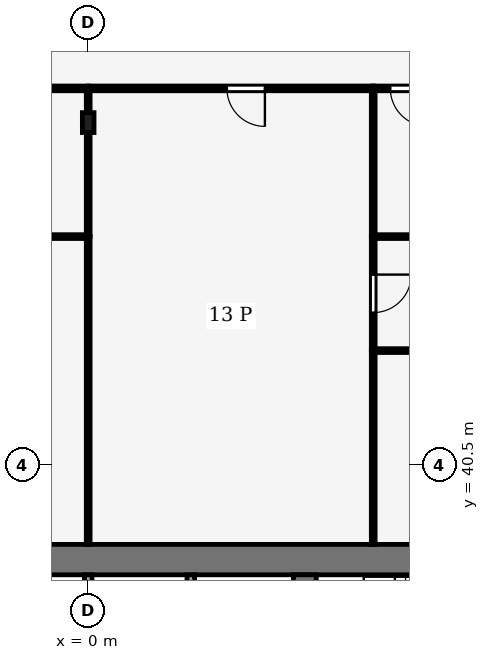
"""IFC4 building model, lengths in metres.
Left out: names, types, materials, properties, quantities, classifications, styles, units other than length and angle.
Written with IfcOpenShell. Run it as: python <this file> out.ifc"""

import sys

from ifc_helpers import new_model, si_unit, direction, frame, frame_2d, origin, origin_2d, place, context, subcontext, project, spatial, rectangle, i_section, extrude, element, fill, save


model = new_model("IFC4")
c1 = context("Model", 3, precision=1e-05, world=origin(), true_north=direction((0.0, 1.0)))
c2 = subcontext(c1, "Body", "Model", "MODEL_VIEW")
j1 = project(units=[si_unit("LENGTHUNIT", "METRE"), si_unit("PLANEANGLEUNIT", "RADIAN")], contexts=[c1])
p1 = place(None, origin())
s1 = spatial("IfcSite", under=j1, at=p1, CompositionType="ELEMENT")
p2 = place(p1, origin())
s2 = spatial("IfcBuilding", under=s1, at=p2, CompositionType="ELEMENT")
p3 = place(p2, frame((0.0, 0.0, 258.0)))
s3 = spatial("IfcBuildingStorey", under=s2, at=p3, CompositionType="ELEMENT", Elevation=258.0)
p4 = place(p3, frame((-13.4, 38.0, -0.13), z_axis=(0.0, 0.0, 1.0), x_axis=(1.0, 0.0, 0.0)))
e1 = element("IfcWall", 1, at=p4, inside=s3, PredefinedType="SHEAR", context=c2, shape_type="SweptSolid", body=[
    extrude(rectangle(XDim=26.8, YDim=0.8, at=frame_2d((13.4, 0.0))), origin(), (0.0, 0.0, 1.0), 4.0),
])
p5 = place(p3, frame((5.7, 18.4, -0.13), z_axis=(0.0, 0.0, 1.0), x_axis=(0.0, 1.0, 0.0)))
e2 = element("IfcWall", 2, at=p5, inside=s3, PredefinedType="SHEAR", context=c2, shape_type="SweptSolid", body=[
    extrude(rectangle(XDim=19.2, YDim=0.6, at=frame_2d((9.6, 0.0))), origin(), (0.0, 0.0, 1.0), 4.0),
])
p6 = place(p5, frame((8.35, 0.0, 0.13)))
e3 = element("IfcOpeningElement", 3, at=p6, cuts=e2, PredefinedType="OPENING", context=c2, shape_type="SweptSolid", body=[
    extrude(rectangle(XDim=0.9, YDim=2.1, at=frame_2d((0.45, 1.05))), frame((0.0, 0.31, 0.0), z_axis=(0.0, -1.0, 0.0), x_axis=(1.0, 0.0, 0.0)), (0.0, 0.0, 1.0), 0.62),
])
p7 = place(p5, frame((13.3, 0.0, 0.13)))
e4 = element("IfcOpeningElement", 4, at=p7, cuts=e2, PredefinedType="OPENING", context=c2, shape_type="SweptSolid", body=[
    extrude(rectangle(XDim=2.4, YDim=2.4, at=frame_2d((1.2, 1.2))), frame((0.0, 0.31, 0.0), z_axis=(0.0, -1.0, 0.0), x_axis=(1.0, 0.0, 0.0)), (0.0, 0.0, 1.0), 0.62),
])
p8 = place(p3, frame((0.0, 49.5, 0.0), z_axis=(0.0, 0.0, 1.0), x_axis=(1.0, 0.0, 0.0)))
e5 = element("IfcColumn", 5, at=p8, inside=s3, PredefinedType="COLUMN", context=c2, shape_type="SweptSolid", body=[
    extrude(i_section(OverallWidth=0.306, OverallDepth=0.524, WebThickness=0.012, FlangeThickness=0.04, FilletRadius=0.027, at=origin_2d()), origin(), (0.0, 0.0, 1.0), 4.0),
])
for number, where, z_axis, x_axis in (
    (6, (0.0, 34.0, 0.0), (0.0, 0.0, 1.0), (0.0, 1.0, 0.0)),
    (7, (2.7, 34.0, 0.0), (0.0, 0.0, 1.0), (0.0, 1.0, 0.0)),
):
    element("IfcWall", number, at=place(p3, frame(where, z_axis=z_axis, x_axis=x_axis)), inside=s3, PredefinedType="PARTITIONING", context=c2, shape_type="SweptSolid", body=[
        extrude(rectangle(XDim=3.6, YDim=0.2, at=frame_2d((1.8, 0.0))), origin(), (0.0, 0.0, 1.0), 3.87),
    ])
p9 = place(p3, frame((0.0, 50.4, 0.0), z_axis=(0.0, 0.0, 1.0), x_axis=(-1.0, 0.0, 0.0)))
e8 = element("IfcWall", 8, at=p9, inside=s3, PredefinedType="PARTITIONING", context=c2, shape_type="SweptSolid", body=[
    extrude(rectangle(XDim=7.5, YDim=0.125, at=frame_2d((3.75, 0.0))), origin(), (0.0, 0.0, 1.0), 3.24),
])
p10 = place(p9, frame((3.65, 0.0, 0.0)))
e9 = element("IfcOpeningElement", 9, at=p10, cuts=e8, PredefinedType="OPENING", context=c2, shape_type="SweptSolid", body=[
    extrude(rectangle(XDim=1.0, YDim=2.1, at=frame_2d((0.5, 1.05))), frame((0.0, 0.073, 0.0), z_axis=(0.0, -1.0, 0.0), x_axis=(1.0, 0.0, 0.0)), (0.0, 0.0, 1.0), 0.145),
])
p11 = place(p3, frame((13.4, 50.4, 0.0), z_axis=(0.0, 0.0, 1.0), x_axis=(-1.0, 0.0, 0.0)))
e10 = element("IfcWall", 10, at=p11, inside=s3, PredefinedType="PARTITIONING", context=c2, shape_type="SweptSolid", body=[
    extrude(rectangle(XDim=5.9, YDim=0.125, at=frame_2d((2.95, 0.0))), origin(), (0.0, 0.0, 1.0), 3.24),
])
p12 = place(p11, frame((4.45, 0.0, 0.0)))
e11 = element("IfcOpeningElement", 11, at=p12, cuts=e10, PredefinedType="OPENING", context=c2, shape_type="SweptSolid", body=[
    extrude(rectangle(XDim=1.0, YDim=2.1, at=frame_2d((0.5, 1.05))), frame((0.0, 0.073, 0.0), z_axis=(0.0, -1.0, 0.0), x_axis=(1.0, 0.0, 0.0)), (0.0, 0.0, 1.0), 0.145),
])
p13 = place(p3, frame((7.5, 50.4, 0.0), z_axis=(0.0, 0.0, 1.0), x_axis=(-1.0, 0.0, 0.0)))
e12 = element("IfcWall", 12, at=p13, inside=s3, PredefinedType="PARTITIONING", context=c2, shape_type="SweptSolid", body=[
    extrude(rectangle(XDim=7.5, YDim=0.125, at=frame_2d((3.75, 0.0))), origin(), (0.0, 0.0, 1.0), 3.24),
])
p14 = place(p13, frame((2.85, 0.0, 0.0)))
e13 = element("IfcOpeningElement", 13, at=p14, cuts=e12, PredefinedType="OPENING", context=c2, shape_type="SweptSolid", body=[
    extrude(rectangle(XDim=1.0, YDim=2.1, at=frame_2d((0.5, 1.05))), frame((0.0, 0.073, 0.0), z_axis=(0.0, -1.0, 0.0), x_axis=(1.0, 0.0, 0.0)), (0.0, 0.0, 1.0), 0.145),
])
p15 = place(p3, frame((0.0, 46.5, 0.0), z_axis=(0.0, 0.0, 1.0), x_axis=(-1.0, 0.0, 0.0)))
e14 = element("IfcWall", 14, at=p15, inside=s3, PredefinedType="PARTITIONING", context=c2, shape_type="SweptSolid", body=[
    extrude(rectangle(XDim=7.5, YDim=0.1, at=frame_2d((3.75, 0.0))), origin(), (0.0, 0.0, 1.0), 3.44),
])
p16 = place(p3, frame((0.0, 38.4, 0.0), z_axis=(0.0, 0.0, 1.0), x_axis=(0.0, 1.0, 0.0)))
e15 = element("IfcWall", 15, at=p16, inside=s3, PredefinedType="PARTITIONING", context=c2, shape_type="SweptSolid", body=[
    extrude(rectangle(XDim=8.104, YDim=0.1, at=frame_2d((4.052, 0.0))), origin(), (0.0, 0.0, 1.0), 3.44),
])
p17 = place(p3, frame((0.0, 46.496, 0.0), z_axis=(0.0, 0.0, 1.0), x_axis=(0.0, 1.0, 0.0)))
e16 = element("IfcWall", 16, at=p17, inside=s3, PredefinedType="PARTITIONING", context=c2, shape_type="SweptSolid", body=[
    extrude(rectangle(XDim=3.904, YDim=0.1, at=frame_2d((1.952, 0.0))), origin(), (0.0, 0.0, 1.0), 3.29),
])
p18 = place(p3, frame((13.4, 43.5, 0.0), z_axis=(0.0, 0.0, 1.0), x_axis=(-1.0, 0.0, 0.0)))
e17 = element("IfcWall", 17, at=p18, inside=s3, PredefinedType="PARTITIONING", context=c2, shape_type="SweptSolid", body=[
    extrude(rectangle(XDim=5.9, YDim=0.1, at=frame_2d((2.95, 0.0))), origin(), (0.0, 0.0, 1.0), 3.44),
])
p19 = place(p3, frame((7.5, 43.504, 0.0), z_axis=(0.0, 0.0, 1.0), x_axis=(0.0, -1.0, 0.0)))
e18 = element("IfcWall", 18, at=p19, inside=s3, PredefinedType="PARTITIONING", context=c2, shape_type="SweptSolid", body=[
    extrude(rectangle(XDim=5.104, YDim=0.1, at=frame_2d((2.552, 0.0))), origin(), (0.0, 0.0, 1.0), 3.87),
])
p20 = place(p3, frame((13.4, 46.5, 0.0), z_axis=(0.0, 0.0, 1.0), x_axis=(-1.0, 0.0, 0.0)))
e19 = element("IfcWall", 19, at=p20, inside=s3, PredefinedType="PARTITIONING", context=c2, shape_type="SweptSolid", body=[
    extrude(rectangle(XDim=5.9, YDim=0.1, at=frame_2d((2.95, 0.0))), origin(), (0.0, 0.0, 1.0), 3.44),
])
p21 = place(p3, frame((7.5, 46.504, 0.0), z_axis=(0.0, 0.0, 1.0), x_axis=(0.0, -1.0, 0.0)))
e20 = element("IfcWall", 20, at=p21, inside=s3, PredefinedType="PARTITIONING", context=c2, shape_type="SweptSolid", body=[
    extrude(rectangle(XDim=3.008, YDim=0.1, at=frame_2d((1.504, 0.0))), origin(), (0.0, 0.0, 1.0), 3.87),
])
p22 = place(p21, frame((1.004, 0.0, 0.0)))
e21 = element("IfcOpeningElement", 21, at=p22, cuts=e20, PredefinedType="OPENING", context=c2, shape_type="SweptSolid", body=[
    extrude(rectangle(XDim=1.0, YDim=2.1, at=frame_2d((0.5, 1.05))), frame((0.0, 0.06, 0.0), z_axis=(0.0, -1.0, 0.0), x_axis=(1.0, 0.0, 0.0)), (0.0, 0.0, 1.0), 0.12),
])
p23 = place(p3, frame((7.5, 50.4, 0.0), z_axis=(0.0, 0.0, 1.0), x_axis=(0.0, -1.0, 0.0)))
e22 = element("IfcWall", 22, at=p23, inside=s3, PredefinedType="PARTITIONING", context=c2, shape_type="SweptSolid", body=[
    extrude(rectangle(XDim=3.904, YDim=0.1, at=frame_2d((1.952, 0.0))), origin(), (0.0, 0.0, 1.0), 3.24),
])
p24 = place(p12, origin())
e23 = element("IfcDoor", 23, at=p24, inside=s3, OperationType="SINGLE_SWING_RIGHT", PredefinedType="DOOR", context=c2, shape_type="SweptSolid", body=[
    extrude(rectangle(XDim=1.0, YDim=2.1, at=frame_2d((0.5, 1.05))), frame((0.0, 0.025, 0.0), z_axis=(0.0, -1.0, 0.0), x_axis=(1.0, 0.0, 0.0)), (0.0, 0.0, 1.0), 0.05),
])
fill(e11, e23)
p25 = place(p14, origin())
e24 = element("IfcDoor", 24, at=p25, inside=s3, OperationType="SINGLE_SWING_LEFT", PredefinedType="DOOR", context=c2, shape_type="SweptSolid", body=[
    extrude(rectangle(XDim=1.0, YDim=2.1, at=frame_2d((0.5, 1.05))), frame((0.0, 0.025, 0.0), z_axis=(0.0, -1.0, 0.0), x_axis=(1.0, 0.0, 0.0)), (0.0, 0.0, 1.0), 0.05),
])
fill(e13, e24)
p26 = place(p22, origin())
e25 = element("IfcDoor", 25, at=p26, inside=s3, OperationType="SINGLE_SWING_LEFT", PredefinedType="DOOR", context=c2, shape_type="SweptSolid", body=[
    extrude(rectangle(XDim=1.0, YDim=2.1, at=frame_2d((0.5, 1.05))), frame((0.0, 0.025, 0.0), z_axis=(0.0, -1.0, 0.0), x_axis=(1.0, 0.0, 0.0)), (0.0, 0.0, 1.0), 0.05),
])
fill(e21, e25)
save(model, sys.argv[1])
